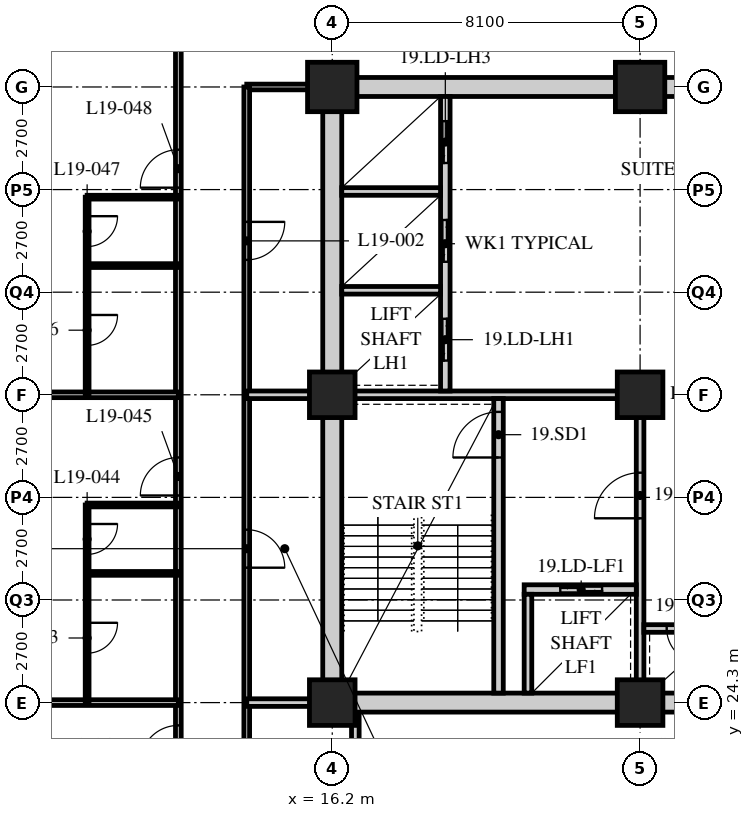
"""IFC4 building model, lengths in metres.
Left out: names, types, materials, properties, quantities, classifications, styles, units other than length and angle.
Written with IfcOpenShell. Run it as: python <this file> out.ifc"""

import sys

from ifc_helpers import new_model, si_unit, direction, frame, frame_2d, origin, origin_2d, place, context, subcontext, project, spatial, rectangle, hollow_rectangle, extrude, element, fill, save


model = new_model("IFC4")
c1 = context("Model", 3, precision=1e-05, world=origin(), true_north=direction((0.0, 1.0)))
c2 = subcontext(c1, "Body", "Model", "MODEL_VIEW")
j1 = project(units=[si_unit("LENGTHUNIT", "METRE"), si_unit("PLANEANGLEUNIT", "RADIAN")], contexts=[c1])
p1 = place(None, origin())
s1 = spatial("IfcSite", under=j1, at=p1, CompositionType="ELEMENT")
p2 = place(p1, origin())
s2 = spatial("IfcBuilding", under=s1, at=p2, CompositionType="ELEMENT")
p3 = place(p2, frame((0.0, 0.0, 77.2)))
s3 = spatial("IfcBuildingStorey", under=s2, at=p3, CompositionType="ELEMENT", Elevation=77.2)
for number, where, z_axis, x_axis in (
    (1, (16.2, 24.3, 0.0), (0.0, 0.0, 1.0), (1.0, 0.0, 0.0)),
    (2, (16.2, 32.4, 0.0), (0.0, 0.0, 1.0), (1.0, 0.0, 0.0)),
):
    element("IfcColumn", number, at=place(p3, frame(where, z_axis=z_axis, x_axis=x_axis)), inside=s3, PredefinedType="COLUMN", context=c2, shape_type="SweptSolid", body=[
        extrude(hollow_rectangle(XDim=1.2, YDim=1.2, WallThickness=0.12, at=origin_2d()), origin(), (0.0, 0.0, 1.0), 3.4),
    ])
p4 = place(p3, frame((16.2, 40.5, 0.0), z_axis=(0.0, 0.0, 1.0), x_axis=(1.0, 0.0, 0.0)))
e3 = element("IfcColumn", 3, at=p4, inside=s3, PredefinedType="COLUMN", context=c2, shape_type="SweptSolid", body=[
    extrude(hollow_rectangle(XDim=1.3, YDim=1.3, WallThickness=0.13, at=origin_2d()), origin(), (0.0, 0.0, 1.0), 3.4),
])
for number, where, z_axis, x_axis in (
    (4, (24.3, 24.3, 0.0), (0.0, 0.0, 1.0), (1.0, 0.0, 0.0)),
    (5, (24.3, 32.4, 0.0), (0.0, 0.0, 1.0), (1.0, 0.0, 0.0)),
):
    element("IfcColumn", number, at=place(p3, frame(where, z_axis=z_axis, x_axis=x_axis)), inside=s3, PredefinedType="COLUMN", context=c2, shape_type="SweptSolid", body=[
        extrude(hollow_rectangle(XDim=1.2, YDim=1.2, WallThickness=0.12, at=origin_2d()), origin(), (0.0, 0.0, 1.0), 3.4),
    ])
p5 = place(p3, frame((24.3, 40.5, 0.0), z_axis=(0.0, 0.0, 1.0), x_axis=(1.0, 0.0, 0.0)))
e6 = element("IfcColumn", 6, at=p5, inside=s3, PredefinedType="COLUMN", context=c2, shape_type="SweptSolid", body=[
    extrude(hollow_rectangle(XDim=1.3, YDim=1.3, WallThickness=0.13, at=origin_2d()), origin(), (0.0, 0.0, 1.0), 3.4),
])
p6 = place(p3, frame((12.15, 16.2, 0.0), z_axis=(0.0, 0.0, 1.0), x_axis=(0.0, 1.0, 0.0)))
e7 = element("IfcWall", 7, at=p6, inside=s3, PredefinedType="PARTITIONING", context=c2, shape_type="SweptSolid", body=[
    extrude(rectangle(XDim=26.1, YDim=0.15, at=frame_2d((13.05, 0.0))), origin(), (0.0, 0.0, 1.0), 3.19),
])
p7 = place(p6, frame((0.3, 0.0, 0.0)))
e8 = element("IfcOpeningElement", 8, at=p7, cuts=e7, PredefinedType="OPENING", context=c2, shape_type="SweptSolid", body=[
    extrude(rectangle(XDim=1.0, YDim=2.1, at=frame_2d((0.5, 1.05))), frame((0.0, 0.085, 0.0), z_axis=(0.0, -1.0, 0.0), x_axis=(1.0, 0.0, 0.0)), (0.0, 0.0, 1.0), 0.17),
])
p8 = place(p6, frame((6.5, 0.0, 0.0)))
e9 = element("IfcOpeningElement", 9, at=p8, cuts=e7, PredefinedType="OPENING", context=c2, shape_type="SweptSolid", body=[
    extrude(rectangle(XDim=1.0, YDim=2.1, at=frame_2d((0.5, 1.05))), frame((0.0, 0.085, 0.0), z_axis=(0.0, -1.0, 0.0), x_axis=(1.0, 0.0, 0.0)), (0.0, 0.0, 1.0), 0.17),
])
p9 = place(p6, frame((13.55, 0.0, 0.0)))
e10 = element("IfcOpeningElement", 10, at=p9, cuts=e7, PredefinedType="OPENING", context=c2, shape_type="SweptSolid", body=[
    extrude(rectangle(XDim=1.0, YDim=2.1, at=frame_2d((0.5, 1.05))), frame((0.0, 0.085, 0.0), z_axis=(0.0, -1.0, 0.0), x_axis=(1.0, 0.0, 0.0)), (0.0, 0.0, 1.0), 0.17),
])
p10 = place(p6, frame((21.65, 0.0, 0.0)))
e11 = element("IfcOpeningElement", 11, at=p10, cuts=e7, PredefinedType="OPENING", context=c2, shape_type="SweptSolid", body=[
    extrude(rectangle(XDim=1.0, YDim=2.1, at=frame_2d((0.5, 1.05))), frame((0.0, 0.085, 0.0), z_axis=(0.0, -1.0, 0.0), x_axis=(1.0, 0.0, 0.0)), (0.0, 0.0, 1.0), 0.17),
])
p11 = place(p3, frame((16.0, 40.5, 0.0), z_axis=(0.0, 0.0, 1.0), x_axis=(-1.0, 0.0, 0.0)))
e12 = element("IfcWall", 12, at=p11, inside=s3, PredefinedType="PARTITIONING", context=c2, shape_type="SweptSolid", body=[
    extrude(rectangle(XDim=2.05, YDim=0.15, at=frame_2d((1.025, 0.0))), origin(), (0.0, 0.0, 1.0), 2.428),
])
p12 = place(p3, frame((13.95, 40.5, 0.0), z_axis=(0.0, 0.0, 1.0), x_axis=(0.0, -1.0, 0.0)))
e13 = element("IfcWall", 13, at=p12, inside=s3, PredefinedType="PARTITIONING", context=c2, shape_type="SweptSolid", body=[
    extrude(rectangle(XDim=22.5, YDim=0.15, at=frame_2d((11.25, 0.0))), origin(), (0.0, 0.0, 1.0), 3.19),
])
p13 = place(p12, frame((11.65, 0.0, 0.0)))
e14 = element("IfcOpeningElement", 14, at=p13, cuts=e13, PredefinedType="OPENING", context=c2, shape_type="SweptSolid", body=[
    extrude(rectangle(XDim=1.0, YDim=2.1, at=frame_2d((0.5, 1.05))), frame((0.0, 0.085, 0.0), z_axis=(0.0, -1.0, 0.0), x_axis=(1.0, 0.0, 0.0)), (0.0, 0.0, 1.0), 0.17),
])
p14 = place(p12, frame((3.55, 0.0, 0.0)))
e15 = element("IfcOpeningElement", 15, at=p14, cuts=e13, PredefinedType="OPENING", context=c2, shape_type="SweptSolid", body=[
    extrude(rectangle(XDim=1.0, YDim=2.1, at=frame_2d((0.5, 1.05))), frame((0.0, 0.085, 0.0), z_axis=(0.0, -1.0, 0.0), x_axis=(1.0, 0.0, 0.0)), (0.0, 0.0, 1.0), 0.17),
])
p15 = place(p3, frame((13.95, 32.4, 0.0), z_axis=(0.0, 0.0, 1.0), x_axis=(1.0, 0.0, 0.0)))
e16 = element("IfcWall", 16, at=p15, inside=s3, PredefinedType="SOLIDWALL", context=c2, shape_type="SweptSolid", body=[
    extrude(rectangle(XDim=2.25, YDim=0.2, at=frame_2d((1.125, 0.0))), origin(), (0.0, 0.0, 1.0), 2.428),
])
p16 = place(p3, frame((16.807, 18.0, 0.0), z_axis=(0.0, 0.0, 1.0), x_axis=(0.0, 1.0, 0.0)))
e17 = element("IfcWall", 17, at=p16, inside=s3, PredefinedType="SOLIDWALL", context=c2, shape_type="SweptSolid", body=[
    extrude(rectangle(XDim=6.3, YDim=0.2, at=frame_2d((3.15, 0.0))), origin(), (0.0, 0.0, 1.0), 3.19),
])
p17 = place(p3, frame((13.95, 24.3, 0.0), z_axis=(0.0, 0.0, 1.0), x_axis=(1.0, 0.0, 0.0)))
e18 = element("IfcWall", 18, at=p17, inside=s3, PredefinedType="SOLIDWALL", context=c2, shape_type="SweptSolid", body=[
    extrude(rectangle(XDim=2.25, YDim=0.2, at=frame_2d((1.125, 0.0))), origin(), (0.0, 0.0, 1.0), 2.428),
])
p18 = place(p3, frame((12.15, 24.3, 0.0), z_axis=(0.0, 0.0, 1.0), x_axis=(-1.0, 0.0, 0.0)))
e19 = element("IfcWall", 19, at=p18, inside=s3, PredefinedType="PARTITIONING", context=c2, shape_type="SweptSolid", body=[
    extrude(rectangle(XDim=11.85, YDim=0.15, at=frame_2d((5.925, 0.0))), origin(), (0.0, 0.0, 1.0), 2.428),
])
p19 = place(p3, frame((9.75, 24.3, 0.0), z_axis=(0.0, 0.0, 1.0), x_axis=(0.0, 1.0, 0.0)))
e20 = element("IfcWall", 20, at=p19, inside=s3, PredefinedType="PARTITIONING", context=c2, shape_type="SweptSolid", body=[
    extrude(rectangle(XDim=5.2, YDim=0.1, at=frame_2d((2.6, 0.0))), origin(), (0.0, 0.0, 1.0), 3.19),
])
p20 = place(p19, frame((1.3, 0.0, 0.0)))
e21 = element("IfcOpeningElement", 21, at=p20, cuts=e20, PredefinedType="OPENING", context=c2, shape_type="SweptSolid", body=[
    extrude(rectangle(XDim=0.8, YDim=2.1, at=frame_2d((0.4, 1.05))), frame((0.0, 0.06, 0.0), z_axis=(0.0, -1.0, 0.0), x_axis=(1.0, 0.0, 0.0)), (0.0, 0.0, 1.0), 0.12),
])
p21 = place(p19, frame((3.9, 0.0, 0.0)))
e22 = element("IfcOpeningElement", 22, at=p21, cuts=e20, PredefinedType="OPENING", context=c2, shape_type="SweptSolid", body=[
    extrude(rectangle(XDim=0.8, YDim=2.1, at=frame_2d((0.4, 1.05))), frame((0.0, 0.06, 0.0), z_axis=(0.0, -1.0, 0.0), x_axis=(1.0, 0.0, 0.0)), (0.0, 0.0, 1.0), 0.12),
])
for number, where, z_axis, x_axis in (
    (23, (12.15, 27.7, 0.0), (0.0, 0.0, 1.0), (-1.0, 0.0, 0.0)),
    (24, (12.15, 29.5, 0.0), (0.0, 0.0, 1.0), (-1.0, 0.0, 0.0)),
):
    element("IfcWall", number, at=place(p3, frame(where, z_axis=z_axis, x_axis=x_axis)), inside=s3, PredefinedType="PARTITIONING", context=c2, shape_type="SweptSolid", body=[
        extrude(rectangle(XDim=2.4, YDim=0.1, at=frame_2d((1.2, 0.0))), origin(), (0.0, 0.0, 1.0), 3.19),
    ])
p22 = place(p3, frame((12.15, 32.4, 0.0), z_axis=(0.0, 0.0, 1.0), x_axis=(-1.0, 0.0, 0.0)))
e25 = element("IfcWall", 25, at=p22, inside=s3, PredefinedType="PARTITIONING", context=c2, shape_type="SweptSolid", body=[
    extrude(rectangle(XDim=11.85, YDim=0.15, at=frame_2d((5.925, 0.0))), origin(), (0.0, 0.0, 1.0), 2.428),
])
p23 = place(p3, frame((9.75, 32.4, 0.0), z_axis=(0.0, 0.0, 1.0), x_axis=(0.0, 1.0, 0.0)))
e26 = element("IfcWall", 26, at=p23, inside=s3, PredefinedType="PARTITIONING", context=c2, shape_type="SweptSolid", body=[
    extrude(rectangle(XDim=5.2, YDim=0.1, at=frame_2d((2.6, 0.0))), origin(), (0.0, 0.0, 1.0), 3.19),
])
p24 = place(p23, frame((1.3, 0.0, 0.0)))
e27 = element("IfcOpeningElement", 27, at=p24, cuts=e26, PredefinedType="OPENING", context=c2, shape_type="SweptSolid", body=[
    extrude(rectangle(XDim=0.8, YDim=2.1, at=frame_2d((0.4, 1.05))), frame((0.0, 0.06, 0.0), z_axis=(0.0, -1.0, 0.0), x_axis=(1.0, 0.0, 0.0)), (0.0, 0.0, 1.0), 0.12),
])
p25 = place(p23, frame((3.9, 0.0, 0.0)))
e28 = element("IfcOpeningElement", 28, at=p25, cuts=e26, PredefinedType="OPENING", context=c2, shape_type="SweptSolid", body=[
    extrude(rectangle(XDim=0.8, YDim=2.1, at=frame_2d((0.4, 1.05))), frame((0.0, 0.06, 0.0), z_axis=(0.0, -1.0, 0.0), x_axis=(1.0, 0.0, 0.0)), (0.0, 0.0, 1.0), 0.12),
])
for number, where, z_axis, x_axis in (
    (29, (12.15, 35.8, 0.0), (0.0, 0.0, 1.0), (-1.0, 0.0, 0.0)),
    (30, (12.15, 37.6, 0.0), (0.0, 0.0, 1.0), (-1.0, 0.0, 0.0)),
):
    element("IfcWall", number, at=place(p3, frame(where, z_axis=z_axis, x_axis=x_axis)), inside=s3, PredefinedType="PARTITIONING", context=c2, shape_type="SweptSolid", body=[
        extrude(rectangle(XDim=2.4, YDim=0.1, at=frame_2d((1.2, 0.0))), origin(), (0.0, 0.0, 1.0), 3.19),
    ])
p26 = place(p3, frame((15.95, 24.3, 0.0), z_axis=(0.0, 0.0, 1.0), x_axis=(1.0, 0.0, 0.0)))
e31 = element("IfcWall", 31, at=p26, inside=s3, PredefinedType="SOLIDWALL", context=c2, shape_type="SweptSolid", body=[
    extrude(rectangle(XDim=24.8, YDim=0.5, at=frame_2d((12.4, 0.0))), origin(), (0.0, 0.0, 1.0), 2.428),
])
p27 = place(p26, frame((11.5, 0.0, 0.0)))
e32 = element("IfcOpeningElement", 32, at=p27, cuts=e31, PredefinedType="OPENING", context=c2, shape_type="SweptSolid", body=[
    extrude(rectangle(XDim=1.8, YDim=2.4, at=frame_2d((0.9, 1.2))), frame((0.0, 0.26, 0.0), z_axis=(0.0, -1.0, 0.0), x_axis=(1.0, 0.0, 0.0)), (0.0, 0.0, 1.0), 0.52),
])
p28 = place(p3, frame((15.95, 40.5, 0.0), z_axis=(0.0, 0.0, 1.0), x_axis=(1.0, 0.0, 0.0)))
e33 = element("IfcWall", 33, at=p28, inside=s3, PredefinedType="SOLIDWALL", context=c2, shape_type="SweptSolid", body=[
    extrude(rectangle(XDim=24.8, YDim=0.5, at=frame_2d((12.4, 0.0))), origin(), (0.0, 0.0, 1.0), 2.428),
])
p29 = place(p28, frame((11.5, 0.0, 0.0)))
e34 = element("IfcOpeningElement", 34, at=p29, cuts=e33, PredefinedType="OPENING", context=c2, shape_type="SweptSolid", body=[
    extrude(rectangle(XDim=1.8, YDim=2.4, at=frame_2d((0.9, 1.2))), frame((0.0, 0.26, 0.0), z_axis=(0.0, -1.0, 0.0), x_axis=(1.0, 0.0, 0.0)), (0.0, 0.0, 1.0), 0.52),
])
p30 = place(p3, frame((16.2, 24.55, 0.0), z_axis=(0.0, 0.0, 1.0), x_axis=(0.0, 1.0, 0.0)))
e35 = element("IfcWall", 35, at=p30, inside=s3, PredefinedType="SOLIDWALL", context=c2, shape_type="SweptSolid", body=[
    extrude(rectangle(XDim=15.7, YDim=0.5, at=frame_2d((7.85, 0.0))), origin(), (0.0, 0.0, 1.0), 2.428),
])
p31 = place(p3, frame((16.45, 32.4, 0.0), z_axis=(0.0, 0.0, 1.0), x_axis=(1.0, 0.0, 0.0)))
e36 = element("IfcWall", 36, at=p31, inside=s3, PredefinedType="SOLIDWALL", context=c2, shape_type="SweptSolid", body=[
    extrude(rectangle(XDim=7.95, YDim=0.2, at=frame_2d((3.975, 0.0))), origin(), (0.0, 0.0, 1.0), 2.578),
])
p32 = place(p3, frame((24.3, 24.55, 0.0), z_axis=(0.0, 0.0, 1.0), x_axis=(0.0, 1.0, 0.0)))
e37 = element("IfcWall", 37, at=p32, inside=s3, PredefinedType="SOLIDWALL", context=c2, shape_type="SweptSolid", body=[
    extrude(rectangle(XDim=7.75, YDim=0.2, at=frame_2d((3.875, 0.0))), origin(), (0.0, 0.0, 1.0), 2.578),
])
p33 = place(p32, frame((4.6, 0.0, 0.0)))
e38 = element("IfcOpeningElement", 38, at=p33, cuts=e37, PredefinedType="OPENING", context=c2, shape_type="SweptSolid", body=[
    extrude(rectangle(XDim=1.2, YDim=2.1, at=frame_2d((0.6, 1.05))), frame((0.0, 0.11, 0.0), z_axis=(0.0, -1.0, 0.0), x_axis=(1.0, 0.0, 0.0)), (0.0, 0.0, 1.0), 0.22),
])
p34 = place(p3, frame((20.575, 24.55, 0.0), z_axis=(0.0, 0.0, 1.0), x_axis=(0.0, 1.0, 0.0)))
e39 = element("IfcWall", 39, at=p34, inside=s3, PredefinedType="SOLIDWALL", context=c2, shape_type="SweptSolid", body=[
    extrude(rectangle(XDim=7.75, YDim=0.25, at=frame_2d((3.875, 0.0))), origin(), (0.0, 0.0, 1.0), 3.19),
])
p35 = place(p34, frame((6.2, 0.0, 0.0)))
e40 = element("IfcOpeningElement", 40, at=p35, cuts=e39, PredefinedType="OPENING", context=c2, shape_type="SweptSolid", body=[
    extrude(rectangle(XDim=1.2, YDim=2.1, at=frame_2d((0.6, 1.05))), frame((0.0, 0.135, 0.0), z_axis=(0.0, -1.0, 0.0), x_axis=(1.0, 0.0, 0.0)), (0.0, 0.0, 1.0), 0.27),
])
p36 = place(p3, frame((21.25, 27.275, 0.0), z_axis=(0.0, 0.0, 1.0), x_axis=(1.0, 0.0, 0.0)))
e41 = element("IfcWall", 41, at=p36, inside=s3, PredefinedType="SOLIDWALL", context=c2, shape_type="SweptSolid", body=[
    extrude(rectangle(XDim=2.95, YDim=0.25, at=frame_2d((1.475, 0.0))), origin(), (0.0, 0.0, 1.0), 3.19),
])
p37 = place(p36, frame((0.95, 0.0, 0.0)))
e42 = element("IfcOpeningElement", 42, at=p37, cuts=e41, PredefinedType="OPENING", context=c2, shape_type="SweptSolid", body=[
    extrude(rectangle(XDim=1.1, YDim=2.4, at=frame_2d((0.55, 1.2))), frame((0.0, 0.135, 0.0), z_axis=(0.0, -1.0, 0.0), x_axis=(1.0, 0.0, 0.0)), (0.0, 0.0, 1.0), 0.27),
])
p38 = place(p3, frame((21.35, 24.55, 0.0), z_axis=(0.0, 0.0, 1.0), x_axis=(0.0, 1.0, 0.0)))
e43 = element("IfcWall", 43, at=p38, inside=s3, PredefinedType="SOLIDWALL", context=c2, shape_type="SweptSolid", body=[
    extrude(rectangle(XDim=2.6, YDim=0.2, at=frame_2d((1.3, 0.0))), origin(), (0.0, 0.0, 1.0), 3.19),
])
p39 = place(p3, frame((19.175, 32.5, 0.0), z_axis=(0.0, 0.0, 1.0), x_axis=(0.0, 1.0, 0.0)))
e44 = element("IfcWall", 44, at=p39, inside=s3, PredefinedType="SOLIDWALL", context=c2, shape_type="SweptSolid", body=[
    extrude(rectangle(XDim=7.75, YDim=0.25, at=frame_2d((3.875, 0.0))), origin(), (0.0, 0.0, 1.0), 3.19),
])
p40 = place(p39, frame((0.8, 0.0, 0.0)))
e45 = element("IfcOpeningElement", 45, at=p40, cuts=e44, PredefinedType="OPENING", context=c2, shape_type="SweptSolid", body=[
    extrude(rectangle(XDim=1.1, YDim=2.4, at=frame_2d((0.55, 1.2))), frame((0.0, 0.135, 0.0), z_axis=(0.0, -1.0, 0.0), x_axis=(1.0, 0.0, 0.0)), (0.0, 0.0, 1.0), 0.27),
])
p41 = place(p39, frame((3.4, 0.0, 0.0)))
e46 = element("IfcOpeningElement", 46, at=p41, cuts=e44, PredefinedType="OPENING", context=c2, shape_type="SweptSolid", body=[
    extrude(rectangle(XDim=1.1, YDim=2.4, at=frame_2d((0.55, 1.2))), frame((0.0, 0.135, 0.0), z_axis=(0.0, -1.0, 0.0), x_axis=(1.0, 0.0, 0.0)), (0.0, 0.0, 1.0), 0.27),
])
p42 = place(p39, frame((6.0, 0.0, 0.0)))
e47 = element("IfcOpeningElement", 47, at=p42, cuts=e44, PredefinedType="OPENING", context=c2, shape_type="SweptSolid", body=[
    extrude(rectangle(XDim=1.1, YDim=2.4, at=frame_2d((0.55, 1.2))), frame((0.0, 0.135, 0.0), z_axis=(0.0, -1.0, 0.0), x_axis=(1.0, 0.0, 0.0)), (0.0, 0.0, 1.0), 0.27),
])
for number, where, z_axis, x_axis in (
    (48, (16.45, 35.15, 0.0), (0.0, 0.0, 1.0), (1.0, 0.0, 0.0)),
    (49, (16.45, 37.75, 0.0), (0.0, 0.0, 1.0), (1.0, 0.0, 0.0)),
):
    element("IfcWall", number, at=place(p3, frame(where, z_axis=z_axis, x_axis=x_axis)), inside=s3, PredefinedType="SOLIDWALL", context=c2, shape_type="SweptSolid", body=[
        extrude(rectangle(XDim=2.6, YDim=0.2, at=frame_2d((1.3, 0.0))), origin(), (0.0, 0.0, 1.0), 3.19),
    ])
p43 = place(p3, frame((24.4, 26.25, 0.0), z_axis=(0.0, 0.0, 1.0), x_axis=(1.0, 0.0, 0.0)))
e50 = element("IfcWall", 50, at=p43, inside=s3, PredefinedType="SOLIDWALL", context=c2, shape_type="SweptSolid", body=[
    extrude(rectangle(XDim=2.15, YDim=0.2, at=frame_2d((1.075, 0.0))), origin(), (0.0, 0.0, 1.0), 3.19),
])
p44 = place(p43, frame((0.6, 0.0, 0.0)))
e51 = element("IfcOpeningElement", 51, at=p44, cuts=e50, PredefinedType="OPENING", context=c2, shape_type="SweptSolid", body=[
    extrude(rectangle(XDim=0.9, YDim=2.1, at=frame_2d((0.45, 1.05))), frame((0.0, 0.11, 0.0), z_axis=(0.0, -1.0, 0.0), x_axis=(1.0, 0.0, 0.0)), (0.0, 0.0, 1.0), 0.22),
])
p45 = place(p13, origin())
e52 = element("IfcDoor", 52, at=p45, inside=s3, OperationType="SINGLE_SWING_RIGHT", PredefinedType="DOOR", context=c2, shape_type="SweptSolid", body=[
    extrude(rectangle(XDim=1.0, YDim=2.1, at=frame_2d((0.5, 1.05))), frame((0.0, 0.025, 0.0), z_axis=(0.0, -1.0, 0.0), x_axis=(1.0, 0.0, 0.0)), (0.0, 0.0, 1.0), 0.05),
])
fill(e14, e52)
p46 = place(p14, origin())
e53 = element("IfcDoor", 53, at=p46, inside=s3, OperationType="SINGLE_SWING_LEFT", PredefinedType="DOOR", context=c2, shape_type="SweptSolid", body=[
    extrude(rectangle(XDim=1.0, YDim=2.1, at=frame_2d((0.5, 1.05))), frame((0.0, 0.025, 0.0), z_axis=(0.0, -1.0, 0.0), x_axis=(1.0, 0.0, 0.0)), (0.0, 0.0, 1.0), 0.05),
])
fill(e15, e53)
p47 = place(p8, origin())
e54 = element("IfcDoor", 54, at=p47, inside=s3, OperationType="SINGLE_SWING_LEFT", PredefinedType="DOOR", context=c2, shape_type="SweptSolid", body=[
    extrude(rectangle(XDim=1.0, YDim=2.1, at=frame_2d((0.5, 1.05))), frame((0.0, 0.025, 0.0), z_axis=(0.0, -1.0, 0.0), x_axis=(1.0, 0.0, 0.0)), (0.0, 0.0, 1.0), 0.05),
])
fill(e9, e54)
p48 = place(p20, origin())
e55 = element("IfcDoor", 55, at=p48, inside=s3, OperationType="SINGLE_SWING_LEFT", PredefinedType="DOOR", context=c2, shape_type="SweptSolid", body=[
    extrude(rectangle(XDim=0.8, YDim=2.1, at=frame_2d((0.4, 1.05))), frame((0.0, 0.025, 0.0), z_axis=(0.0, -1.0, 0.0), x_axis=(1.0, 0.0, 0.0)), (0.0, 0.0, 1.0), 0.05),
])
fill(e21, e55)
p49 = place(p21, origin())
e56 = element("IfcDoor", 56, at=p49, inside=s3, OperationType="SINGLE_SWING_LEFT", PredefinedType="DOOR", context=c2, shape_type="SweptSolid", body=[
    extrude(rectangle(XDim=0.8, YDim=2.1, at=frame_2d((0.4, 1.05))), frame((0.0, 0.025, 0.0), z_axis=(0.0, -1.0, 0.0), x_axis=(1.0, 0.0, 0.0)), (0.0, 0.0, 1.0), 0.05),
])
fill(e22, e56)
p50 = place(p9, origin())
e57 = element("IfcDoor", 57, at=p50, inside=s3, OperationType="SINGLE_SWING_LEFT", PredefinedType="DOOR", context=c2, shape_type="SweptSolid", body=[
    extrude(rectangle(XDim=1.0, YDim=2.1, at=frame_2d((0.5, 1.05))), frame((0.0, 0.025, 0.0), z_axis=(0.0, -1.0, 0.0), x_axis=(1.0, 0.0, 0.0)), (0.0, 0.0, 1.0), 0.05),
])
fill(e10, e57)
p51 = place(p24, origin())
e58 = element("IfcDoor", 58, at=p51, inside=s3, OperationType="SINGLE_SWING_LEFT", PredefinedType="DOOR", context=c2, shape_type="SweptSolid", body=[
    extrude(rectangle(XDim=0.8, YDim=2.1, at=frame_2d((0.4, 1.05))), frame((0.0, 0.025, 0.0), z_axis=(0.0, -1.0, 0.0), x_axis=(1.0, 0.0, 0.0)), (0.0, 0.0, 1.0), 0.05),
])
fill(e27, e58)
p52 = place(p25, origin())
e59 = element("IfcDoor", 59, at=p52, inside=s3, OperationType="SINGLE_SWING_LEFT", PredefinedType="DOOR", context=c2, shape_type="SweptSolid", body=[
    extrude(rectangle(XDim=0.8, YDim=2.1, at=frame_2d((0.4, 1.05))), frame((0.0, 0.025, 0.0), z_axis=(0.0, -1.0, 0.0), x_axis=(1.0, 0.0, 0.0)), (0.0, 0.0, 1.0), 0.05),
])
fill(e28, e59)
p53 = place(p10, origin())
e60 = element("IfcDoor", 60, at=p53, inside=s3, OperationType="SINGLE_SWING_LEFT", PredefinedType="DOOR", context=c2, shape_type="SweptSolid", body=[
    extrude(rectangle(XDim=1.0, YDim=2.1, at=frame_2d((0.5, 1.05))), frame((0.0, 0.025, 0.0), z_axis=(0.0, -1.0, 0.0), x_axis=(1.0, 0.0, 0.0)), (0.0, 0.0, 1.0), 0.05),
])
fill(e11, e60)
p54 = place(p35, origin())
e61 = element("IfcDoor", 61, at=p54, inside=s3, OperationType="SINGLE_SWING_LEFT", PredefinedType="DOOR", context=c2, shape_type="SweptSolid", body=[
    extrude(rectangle(XDim=1.2, YDim=2.1, at=frame_2d((0.6, 1.05))), frame((0.0, 0.025, 0.0), z_axis=(0.0, -1.0, 0.0), x_axis=(1.0, 0.0, 0.0)), (0.0, 0.0, 1.0), 0.05),
])
fill(e40, e61)
p55 = place(p33, origin())
e62 = element("IfcDoor", 62, at=p55, inside=s3, OperationType="SINGLE_SWING_LEFT", PredefinedType="DOOR", context=c2, shape_type="SweptSolid", body=[
    extrude(rectangle(XDim=1.2, YDim=2.1, at=frame_2d((0.6, 1.05))), frame((0.0, 0.025, 0.0), z_axis=(0.0, -1.0, 0.0), x_axis=(1.0, 0.0, 0.0)), (0.0, 0.0, 1.0), 0.05),
])
fill(e38, e62)
p56 = place(p44, origin())
e63 = element("IfcDoor", 63, at=p56, inside=s3, OperationType="SINGLE_SWING_LEFT", PredefinedType="DOOR", context=c2, shape_type="SweptSolid", body=[
    extrude(rectangle(XDim=0.9, YDim=2.1, at=frame_2d((0.45, 1.05))), frame((0.0, 0.025, 0.0), z_axis=(0.0, -1.0, 0.0), x_axis=(1.0, 0.0, 0.0)), (0.0, 0.0, 1.0), 0.05),
])
fill(e51, e63)
p57 = place(p40, origin())
e64 = element("IfcDoor", 64, at=p57, inside=s3, OperationType="DOUBLE_DOOR_SLIDING", PredefinedType="DOOR", context=c2, shape_type="SweptSolid", body=[
    extrude(rectangle(XDim=1.1, YDim=2.4, at=frame_2d((0.55, 1.2))), frame((0.0, 0.025, 0.0), z_axis=(0.0, -1.0, 0.0), x_axis=(1.0, 0.0, 0.0)), (0.0, 0.0, 1.0), 0.05),
])
fill(e45, e64)
p58 = place(p41, origin())
e65 = element("IfcDoor", 65, at=p58, inside=s3, OperationType="DOUBLE_DOOR_SLIDING", PredefinedType="DOOR", context=c2, shape_type="SweptSolid", body=[
    extrude(rectangle(XDim=1.1, YDim=2.4, at=frame_2d((0.55, 1.2))), frame((0.0, 0.025, 0.0), z_axis=(0.0, -1.0, 0.0), x_axis=(1.0, 0.0, 0.0)), (0.0, 0.0, 1.0), 0.05),
])
fill(e46, e65)
p59 = place(p42, origin())
e66 = element("IfcDoor", 66, at=p59, inside=s3, OperationType="DOUBLE_DOOR_SLIDING", PredefinedType="DOOR", context=c2, shape_type="SweptSolid", body=[
    extrude(rectangle(XDim=1.1, YDim=2.4, at=frame_2d((0.55, 1.2))), frame((0.0, 0.025, 0.0), z_axis=(0.0, -1.0, 0.0), x_axis=(1.0, 0.0, 0.0)), (0.0, 0.0, 1.0), 0.05),
])
fill(e47, e66)
p60 = place(p37, origin())
e67 = element("IfcDoor", 67, at=p60, inside=s3, OperationType="DOUBLE_DOOR_SLIDING", PredefinedType="DOOR", context=c2, shape_type="SweptSolid", body=[
    extrude(rectangle(XDim=1.1, YDim=2.4, at=frame_2d((0.55, 1.2))), frame((0.0, 0.025, 0.0), z_axis=(0.0, -1.0, 0.0), x_axis=(1.0, 0.0, 0.0)), (0.0, 0.0, 1.0), 0.05),
])
fill(e42, e67)
save(model, sys.argv[1])
